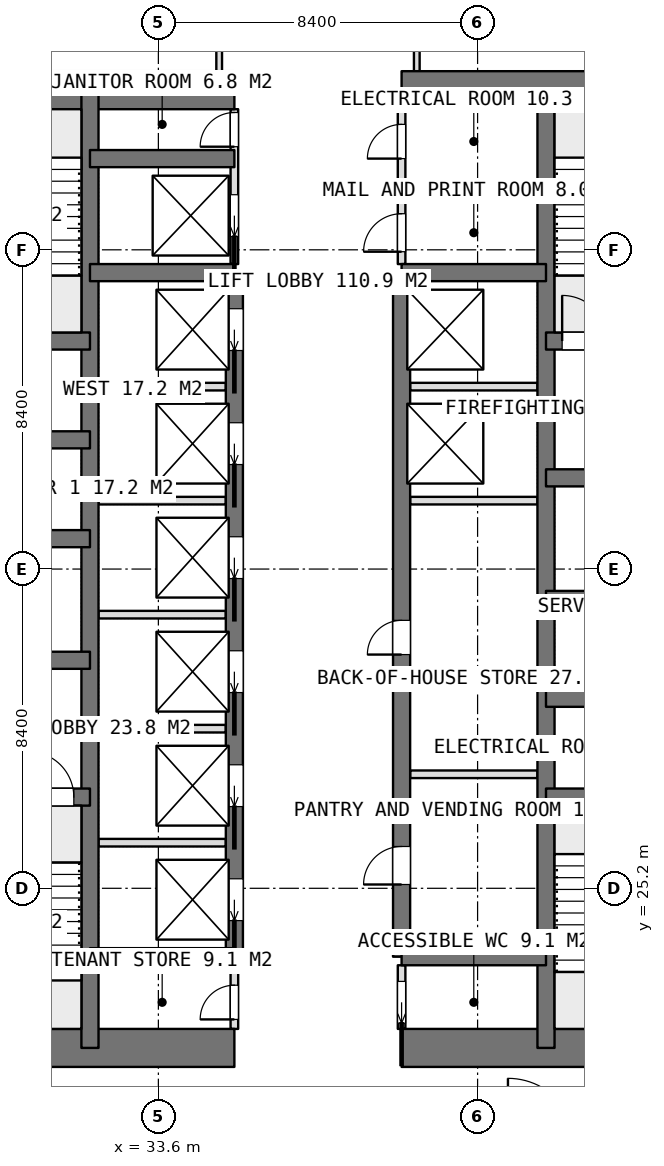
"""IFC4 building model, lengths in metres.
Left out: names, types, materials, properties, quantities, classifications, styles, units other than length and angle.
Written with IfcOpenShell. Run it as: python <this file> out.ifc"""

import sys

from ifc_helpers import new_model, si_unit, direction, frame, frame_2d, origin, place, context, subcontext, project, spatial, rectangle, extrude, element, fill, save


model = new_model("IFC4")
c1 = context("Model", 3, precision=1e-05, world=origin(), true_north=direction((0.0, 1.0)))
c2 = subcontext(c1, "Body", "Model", "MODEL_VIEW")
j1 = project(units=[si_unit("LENGTHUNIT", "METRE"), si_unit("PLANEANGLEUNIT", "RADIAN")], contexts=[c1])
p1 = place(None, origin())
s1 = spatial("IfcSite", under=j1, at=p1, CompositionType="ELEMENT")
p2 = place(p1, origin())
s2 = spatial("IfcBuilding", under=s1, at=p2, CompositionType="ELEMENT")
p3 = place(p2, frame((0.0, 0.0, 202.7)))
s3 = spatial("IfcBuildingStorey", under=s2, at=p3, CompositionType="ELEMENT", Elevation=202.7)
p4 = place(p3, frame((25.2, 21.0, 0.0), z_axis=(0.0, 0.0, 1.0), x_axis=(1.0, 0.0, 0.0)))
e1 = element("IfcWall", 1, at=p4, inside=s3, PredefinedType="SHEAR", context=c2, shape_type="SweptSolid", body=[
    extrude(rectangle(XDim=10.4, YDim=1.0, at=frame_2d((5.2, 0.0))), origin(), (0.0, 0.0, 1.0), 3.75),
])
p5 = place(p3, frame((40.0, 21.0, 0.0), z_axis=(0.0, 0.0, 1.0), x_axis=(1.0, 0.0, 0.0)))
e2 = element("IfcWall", 2, at=p5, inside=s3, PredefinedType="SHEAR", context=c2, shape_type="SweptSolid", body=[
    extrude(rectangle(XDim=10.4, YDim=1.0, at=frame_2d((5.2, 0.0))), origin(), (0.0, 0.0, 1.0), 3.75),
])
p6 = place(p3, frame((25.2, 46.2, 0.0), z_axis=(0.0, 0.0, 1.0), x_axis=(1.0, 0.0, 0.0)))
e3 = element("IfcWall", 3, at=p6, inside=s3, PredefinedType="SHEAR", context=c2, shape_type="SweptSolid", body=[
    extrude(rectangle(XDim=10.4, YDim=1.0, at=frame_2d((5.2, 0.0))), origin(), (0.0, 0.0, 1.0), 3.75),
])
p7 = place(p3, frame((40.0, 46.2, 0.0), z_axis=(0.0, 0.0, 1.0), x_axis=(1.0, 0.0, 0.0)))
e4 = element("IfcWall", 4, at=p7, inside=s3, PredefinedType="SHEAR", context=c2, shape_type="SweptSolid", body=[
    extrude(rectangle(XDim=10.4, YDim=1.0, at=frame_2d((5.2, 0.0))), origin(), (0.0, 0.0, 1.0), 3.75),
])
for number, where, z_axis, x_axis in (
    (5, (31.8, 21.0, 0.0), (0.0, 0.0, 1.0), (0.0, 1.0, 0.0)),
    (6, (43.8, 21.0, 0.0), (0.0, 0.0, 1.0), (0.0, 1.0, 0.0)),
):
    element("IfcWall", number, at=place(p3, frame(where, z_axis=z_axis, x_axis=x_axis)), inside=s3, PredefinedType="SHEAR", context=c2, shape_type="SweptSolid", body=[
        extrude(rectangle(XDim=25.2, YDim=0.45, at=frame_2d((12.6, 0.0))), origin(), (0.0, 0.0, 1.0), 3.75),
    ])
p8 = place(p3, frame((35.6, 23.4, 0.0), z_axis=(0.0, 0.0, 1.0), x_axis=(0.0, 1.0, 0.0)))
e7 = element("IfcWall", 7, at=p8, inside=s3, PredefinedType="SHEAR", context=c2, shape_type="SweptSolid", body=[
    extrude(rectangle(XDim=18.0, YDim=0.45, at=frame_2d((9.0, 0.0))), origin(), (0.0, 0.0, 1.0), 3.75),
])
p9 = place(p8, frame((0.95, 0.0, 0.0)))
e8 = element("IfcOpeningElement", 8, at=p9, cuts=e7, PredefinedType="OPENING", context=c2, shape_type="SweptSolid", body=[
    extrude(rectangle(XDim=1.1, YDim=2.1, at=frame_2d((0.55, 1.05))), frame((0.0, 0.235, 0.0), z_axis=(0.0, -1.0, 0.0), x_axis=(1.0, 0.0, 0.0)), (0.0, 0.0, 1.0), 0.47),
])
p10 = place(p8, frame((3.95, 0.0, 0.0)))
e9 = element("IfcOpeningElement", 9, at=p10, cuts=e7, PredefinedType="OPENING", context=c2, shape_type="SweptSolid", body=[
    extrude(rectangle(XDim=1.1, YDim=2.1, at=frame_2d((0.55, 1.05))), frame((0.0, 0.235, 0.0), z_axis=(0.0, -1.0, 0.0), x_axis=(1.0, 0.0, 0.0)), (0.0, 0.0, 1.0), 0.47),
])
p11 = place(p8, frame((6.95, 0.0, 0.0)))
e10 = element("IfcOpeningElement", 10, at=p11, cuts=e7, PredefinedType="OPENING", context=c2, shape_type="SweptSolid", body=[
    extrude(rectangle(XDim=1.1, YDim=2.1, at=frame_2d((0.55, 1.05))), frame((0.0, 0.235, 0.0), z_axis=(0.0, -1.0, 0.0), x_axis=(1.0, 0.0, 0.0)), (0.0, 0.0, 1.0), 0.47),
])
p12 = place(p8, frame((9.95, 0.0, 0.0)))
e11 = element("IfcOpeningElement", 11, at=p12, cuts=e7, PredefinedType="OPENING", context=c2, shape_type="SweptSolid", body=[
    extrude(rectangle(XDim=1.1, YDim=2.1, at=frame_2d((0.55, 1.05))), frame((0.0, 0.235, 0.0), z_axis=(0.0, -1.0, 0.0), x_axis=(1.0, 0.0, 0.0)), (0.0, 0.0, 1.0), 0.47),
])
p13 = place(p8, frame((12.95, 0.0, 0.0)))
e12 = element("IfcOpeningElement", 12, at=p13, cuts=e7, PredefinedType="OPENING", context=c2, shape_type="SweptSolid", body=[
    extrude(rectangle(XDim=1.1, YDim=2.1, at=frame_2d((0.55, 1.05))), frame((0.0, 0.235, 0.0), z_axis=(0.0, -1.0, 0.0), x_axis=(1.0, 0.0, 0.0)), (0.0, 0.0, 1.0), 0.47),
])
p14 = place(p8, frame((15.95, 0.0, 0.0)))
e13 = element("IfcOpeningElement", 13, at=p14, cuts=e7, PredefinedType="OPENING", context=c2, shape_type="SweptSolid", body=[
    extrude(rectangle(XDim=1.1, YDim=2.1, at=frame_2d((0.55, 1.05))), frame((0.0, 0.235, 0.0), z_axis=(0.0, -1.0, 0.0), x_axis=(1.0, 0.0, 0.0)), (0.0, 0.0, 1.0), 0.47),
])
p15 = place(p3, frame((40.0, 23.4, 0.0), z_axis=(0.0, 0.0, 1.0), x_axis=(0.0, 1.0, 0.0)))
e14 = element("IfcWall", 14, at=p15, inside=s3, PredefinedType="SHEAR", context=c2, shape_type="SweptSolid", body=[
    extrude(rectangle(XDim=18.0, YDim=0.45, at=frame_2d((9.0, 0.0))), origin(), (0.0, 0.0, 1.0), 3.75),
])
p16 = place(p15, frame((1.9, 0.0, 0.0)))
e15 = element("IfcOpeningElement", 15, at=p16, cuts=e14, PredefinedType="OPENING", context=c2, shape_type="SweptSolid", body=[
    extrude(rectangle(XDim=1.0, YDim=2.1, at=frame_2d((0.5, 1.05))), frame((0.0, 0.235, 0.0), z_axis=(0.0, -1.0, 0.0), x_axis=(1.0, 0.0, 0.0)), (0.0, 0.0, 1.0), 0.47),
])
p17 = place(p15, frame((7.95, 0.0, 0.0)))
e16 = element("IfcOpeningElement", 16, at=p17, cuts=e14, PredefinedType="OPENING", context=c2, shape_type="SweptSolid", body=[
    extrude(rectangle(XDim=0.9, YDim=2.1, at=frame_2d((0.45, 1.05))), frame((0.0, 0.235, 0.0), z_axis=(0.0, -1.0, 0.0), x_axis=(1.0, 0.0, 0.0)), (0.0, 0.0, 1.0), 0.47),
])
for number, where, z_axis, x_axis in (
    (17, (31.8, 23.4, 0.0), (0.0, 0.0, 1.0), (1.0, 0.0, 0.0)),
    (18, (31.8, 41.4, 0.0), (0.0, 0.0, 1.0), (1.0, 0.0, 0.0)),
    (19, (31.8, 44.4, 0.0), (0.0, 0.0, 1.0), (1.0, 0.0, 0.0)),
    (20, (40.0, 23.4, 0.0), (0.0, 0.0, 1.0), (1.0, 0.0, 0.0)),
    (21, (40.0, 41.4, 0.0), (0.0, 0.0, 1.0), (1.0, 0.0, 0.0)),
):
    element("IfcWall", number, at=place(p3, frame(where, z_axis=z_axis, x_axis=x_axis)), inside=s3, PredefinedType="SHEAR", context=c2, shape_type="SweptSolid", body=[
        extrude(rectangle(XDim=3.8, YDim=0.45, at=frame_2d((1.9, 0.0))), origin(), (0.0, 0.0, 1.0), 3.75),
    ])
p18 = place(p3, frame((25.2, 27.6, 0.0), z_axis=(0.0, 0.0, 1.0), x_axis=(1.0, 0.0, 0.0)))
e22 = element("IfcWall", 22, at=p18, inside=s3, PredefinedType="SHEAR", context=c2, shape_type="SweptSolid", body=[
    extrude(rectangle(XDim=6.6, YDim=0.45, at=frame_2d((3.3, 0.0))), origin(), (0.0, 0.0, 1.0), 3.75),
])
p19 = place(p18, frame((4.975, 0.0, 0.0)))
e23 = element("IfcOpeningElement", 23, at=p19, cuts=e22, PredefinedType="OPENING", context=c2, shape_type="SweptSolid", body=[
    extrude(rectangle(XDim=1.2, YDim=2.1, at=frame_2d((0.6, 1.05))), frame((0.0, 0.235, 0.0), z_axis=(0.0, -1.0, 0.0), x_axis=(1.0, 0.0, 0.0)), (0.0, 0.0, 1.0), 0.47),
])
p20 = place(p3, frame((25.2, 31.2, 0.0), z_axis=(0.0, 0.0, 1.0), x_axis=(1.0, 0.0, 0.0)))
e24 = element("IfcWall", 24, at=p20, inside=s3, PredefinedType="SHEAR", context=c2, shape_type="SweptSolid", body=[
    extrude(rectangle(XDim=6.6, YDim=0.45, at=frame_2d((3.3, 0.0))), origin(), (0.0, 0.0, 1.0), 3.75),
])
p21 = place(p20, frame((2.65, 0.0, 0.0)))
e25 = element("IfcOpeningElement", 25, at=p21, cuts=e24, PredefinedType="OPENING", context=c2, shape_type="SweptSolid", body=[
    extrude(rectangle(XDim=1.3, YDim=2.1, at=frame_2d((0.65, 1.05))), frame((0.0, 0.235, 0.0), z_axis=(0.0, -1.0, 0.0), x_axis=(1.0, 0.0, 0.0)), (0.0, 0.0, 1.0), 0.47),
])
for number, where, z_axis, x_axis in (
    (26, (25.2, 34.4, 0.0), (0.0, 0.0, 1.0), (1.0, 0.0, 0.0)),
    (27, (25.2, 37.0, 0.0), (0.0, 0.0, 1.0), (1.0, 0.0, 0.0)),
    (28, (25.2, 39.6, 0.0), (0.0, 0.0, 1.0), (1.0, 0.0, 0.0)),
):
    element("IfcWall", number, at=place(p3, frame(where, z_axis=z_axis, x_axis=x_axis)), inside=s3, PredefinedType="SHEAR", context=c2, shape_type="SweptSolid", body=[
        extrude(rectangle(XDim=6.6, YDim=0.45, at=frame_2d((3.3, 0.0))), origin(), (0.0, 0.0, 1.0), 3.75),
    ])
for number, where, z_axis, x_axis in (
    (29, (43.8, 27.6, 0.0), (0.0, 0.0, 1.0), (1.0, 0.0, 0.0)),
    (30, (43.8, 30.2, 0.0), (0.0, 0.0, 1.0), (1.0, 0.0, 0.0)),
    (31, (43.8, 32.8, 0.0), (0.0, 0.0, 1.0), (1.0, 0.0, 0.0)),
):
    element("IfcWall", number, at=place(p3, frame(where, z_axis=z_axis, x_axis=x_axis)), inside=s3, PredefinedType="SHEAR", context=c2, shape_type="SweptSolid", body=[
        extrude(rectangle(XDim=6.6, YDim=0.45, at=frame_2d((3.3, 0.0))), origin(), (0.0, 0.0, 1.0), 3.75),
    ])
p22 = place(p3, frame((43.8, 36.0, 0.0), z_axis=(0.0, 0.0, 1.0), x_axis=(1.0, 0.0, 0.0)))
e32 = element("IfcWall", 32, at=p22, inside=s3, PredefinedType="SHEAR", context=c2, shape_type="SweptSolid", body=[
    extrude(rectangle(XDim=6.6, YDim=0.45, at=frame_2d((3.3, 0.0))), origin(), (0.0, 0.0, 1.0), 3.75),
])
p23 = place(p22, frame((2.65, 0.0, 0.0)))
e33 = element("IfcOpeningElement", 33, at=p23, cuts=e32, PredefinedType="OPENING", context=c2, shape_type="SweptSolid", body=[
    extrude(rectangle(XDim=1.3, YDim=2.1, at=frame_2d((0.65, 1.05))), frame((0.0, 0.235, 0.0), z_axis=(0.0, -1.0, 0.0), x_axis=(1.0, 0.0, 0.0)), (0.0, 0.0, 1.0), 0.47),
])
p24 = place(p3, frame((43.8, 39.6, 0.0), z_axis=(0.0, 0.0, 1.0), x_axis=(1.0, 0.0, 0.0)))
e34 = element("IfcWall", 34, at=p24, inside=s3, PredefinedType="SHEAR", context=c2, shape_type="SweptSolid", body=[
    extrude(rectangle(XDim=6.6, YDim=0.45, at=frame_2d((3.3, 0.0))), origin(), (0.0, 0.0, 1.0), 3.75),
])
p25 = place(p24, frame((0.425, 0.0, 0.0)))
e35 = element("IfcOpeningElement", 35, at=p25, cuts=e34, PredefinedType="OPENING", context=c2, shape_type="SweptSolid", body=[
    extrude(rectangle(XDim=1.2, YDim=2.1, at=frame_2d((0.6, 1.05))), frame((0.0, 0.235, 0.0), z_axis=(0.0, -1.0, 0.0), x_axis=(1.0, 0.0, 0.0)), (0.0, 0.0, 1.0), 0.47),
])
for number, where, z_axis, x_axis in (
    (36, (32.025, 26.4, 0.0), (0.0, 0.0, 1.0), (1.0, 0.0, 0.0)),
    (37, (32.025, 29.4, 0.0), (0.0, 0.0, 1.0), (1.0, 0.0, 0.0)),
    (38, (32.025, 32.4, 0.0), (0.0, 0.0, 1.0), (1.0, 0.0, 0.0)),
    (39, (32.025, 35.4, 0.0), (0.0, 0.0, 1.0), (1.0, 0.0, 0.0)),
    (40, (32.025, 38.4, 0.0), (0.0, 0.0, 1.0), (1.0, 0.0, 0.0)),
):
    element("IfcWall", number, at=place(p3, frame(where, z_axis=z_axis, x_axis=x_axis)), inside=s3, PredefinedType="PARTITIONING", context=c2, shape_type="SweptSolid", body=[
        extrude(rectangle(XDim=3.35, YDim=0.2, at=frame_2d((1.675, 0.0))), origin(), (0.0, 0.0, 1.0), 3.5),
    ])
for number, where, z_axis, x_axis in (
    (41, (40.225, 35.4, 0.0), (0.0, 0.0, 1.0), (1.0, 0.0, 0.0)),
    (42, (40.225, 38.4, 0.0), (0.0, 0.0, 1.0), (1.0, 0.0, 0.0)),
):
    element("IfcWall", number, at=place(p3, frame(where, z_axis=z_axis, x_axis=x_axis)), inside=s3, PredefinedType="PARTITIONING", context=c2, shape_type="SweptSolid", body=[
        extrude(rectangle(XDim=3.35, YDim=0.2, at=frame_2d((1.675, 0.0))), origin(), (0.0, 0.0, 1.0), 3.5),
    ])
p26 = place(p3, frame((40.0, 21.5, 0.0), z_axis=(0.0, 0.0, 1.0), x_axis=(0.0, 1.0, 0.0)))
e43 = element("IfcWall", 43, at=p26, inside=s3, PredefinedType="PARTITIONING", context=c2, shape_type="SweptSolid", body=[
    extrude(rectangle(XDim=1.675, YDim=0.2, at=frame_2d((0.837, 0.0))), origin(), (0.0, 0.0, 1.0), 3.5),
])
p27 = place(p26, frame((0.15, 0.0, 0.0)))
e44 = element("IfcOpeningElement", 44, at=p27, cuts=e43, PredefinedType="OPENING", context=c2, shape_type="SweptSolid", body=[
    extrude(rectangle(XDim=1.1, YDim=2.1, at=frame_2d((0.55, 1.05))), frame((0.0, 0.11, 0.0), z_axis=(0.0, -1.0, 0.0), x_axis=(1.0, 0.0, 0.0)), (0.0, 0.0, 1.0), 0.22),
])
p28 = place(p3, frame((40.0, 41.625, 0.0), z_axis=(0.0, 0.0, 1.0), x_axis=(0.0, 1.0, 0.0)))
e45 = element("IfcWall", 45, at=p28, inside=s3, PredefinedType="PARTITIONING", context=c2, shape_type="SweptSolid", body=[
    extrude(rectangle(XDim=4.075, YDim=0.2, at=frame_2d((2.038, 0.0))), origin(), (0.0, 0.0, 1.0), 3.5),
])
p29 = place(p28, frame((2.775, 0.0, 0.0)))
e46 = element("IfcOpeningElement", 46, at=p29, cuts=e45, PredefinedType="OPENING", context=c2, shape_type="SweptSolid", body=[
    extrude(rectangle(XDim=0.9, YDim=2.1, at=frame_2d((0.45, 1.05))), frame((0.0, 0.11, 0.0), z_axis=(0.0, -1.0, 0.0), x_axis=(1.0, 0.0, 0.0)), (0.0, 0.0, 1.0), 0.22),
])
p30 = place(p28, frame((0.325, 0.0, 0.0)))
e47 = element("IfcOpeningElement", 47, at=p30, cuts=e45, PredefinedType="OPENING", context=c2, shape_type="SweptSolid", body=[
    extrude(rectangle(XDim=1.0, YDim=2.1, at=frame_2d((0.5, 1.05))), frame((0.0, 0.11, 0.0), z_axis=(0.0, -1.0, 0.0), x_axis=(1.0, 0.0, 0.0)), (0.0, 0.0, 1.0), 0.22),
])
p31 = place(p3, frame((35.6, 41.625, 0.0), z_axis=(0.0, 0.0, 1.0), x_axis=(0.0, 1.0, 0.0)))
e48 = element("IfcWall", 48, at=p31, inside=s3, PredefinedType="PARTITIONING", context=c2, shape_type="SweptSolid", body=[
    extrude(rectangle(XDim=4.075, YDim=0.2, at=frame_2d((2.038, 0.0))), origin(), (0.0, 0.0, 1.0), 3.5),
])
p32 = place(p31, frame((3.088, 0.0, 0.0)))
e49 = element("IfcOpeningElement", 49, at=p32, cuts=e48, PredefinedType="OPENING", context=c2, shape_type="SweptSolid", body=[
    extrude(rectangle(XDim=0.9, YDim=2.1, at=frame_2d((0.45, 1.05))), frame((0.0, 0.11, 0.0), z_axis=(0.0, -1.0, 0.0), x_axis=(1.0, 0.0, 0.0)), (0.0, 0.0, 1.0), 0.22),
])
p33 = place(p31, frame((0.725, 0.0, 0.0)))
e50 = element("IfcOpeningElement", 50, at=p33, cuts=e48, PredefinedType="OPENING", context=c2, shape_type="SweptSolid", body=[
    extrude(rectangle(XDim=1.1, YDim=2.1, at=frame_2d((0.55, 1.05))), frame((0.0, 0.11, 0.0), z_axis=(0.0, -1.0, 0.0), x_axis=(1.0, 0.0, 0.0)), (0.0, 0.0, 1.0), 0.22),
])
p34 = place(p3, frame((35.6, 21.5, 0.0), z_axis=(0.0, 0.0, 1.0), x_axis=(0.0, 1.0, 0.0)))
e51 = element("IfcWall", 51, at=p34, inside=s3, PredefinedType="PARTITIONING", context=c2, shape_type="SweptSolid", body=[
    extrude(rectangle(XDim=1.675, YDim=0.2, at=frame_2d((0.837, 0.0))), origin(), (0.0, 0.0, 1.0), 3.5),
])
p35 = place(p34, frame((0.25, 0.0, 0.0)))
e52 = element("IfcOpeningElement", 52, at=p35, cuts=e51, PredefinedType="OPENING", context=c2, shape_type="SweptSolid", body=[
    extrude(rectangle(XDim=0.9, YDim=2.1, at=frame_2d((0.45, 1.05))), frame((0.0, 0.11, 0.0), z_axis=(0.0, -1.0, 0.0), x_axis=(1.0, 0.0, 0.0)), (0.0, 0.0, 1.0), 0.22),
])
p36 = place(p3, frame((40.225, 28.2, 0.0), z_axis=(0.0, 0.0, 1.0), x_axis=(1.0, 0.0, 0.0)))
e53 = element("IfcWall", 53, at=p36, inside=s3, PredefinedType="PARTITIONING", context=c2, shape_type="SweptSolid", body=[
    extrude(rectangle(XDim=3.35, YDim=0.2, at=frame_2d((1.675, 0.0))), origin(), (0.0, 0.0, 1.0), 3.5),
])
p37 = place(p3, frame((40.0, 43.5, 0.0), z_axis=(0.0, 0.0, 1.0), x_axis=(1.0, 0.0, 0.0)))
e54 = element("IfcWall", 54, at=p37, inside=s3, PredefinedType="PARTITIONING", context=c2, shape_type="SweptSolid", body=[
    extrude(rectangle(XDim=3.575, YDim=0.2, at=frame_2d((1.788, 0.0))), origin(), (0.0, 0.0, 1.0), 3.5),
])
for number, where, z_axis, x_axis in (
    (55, (40.4, 46.7, 0.0), (0.0, 0.0, 1.0), (0.0, 1.0, 0.0)),
    (56, (35.2, 46.7, 0.0), (0.0, 0.0, 1.0), (0.0, 1.0, 0.0)),
):
    element("IfcWall", number, at=place(p3, frame(where, z_axis=z_axis, x_axis=x_axis)), inside=s3, PredefinedType="PARTITIONING", context=c2, shape_type="SweptSolid", body=[
        extrude(rectangle(XDim=2.625, YDim=0.15, at=frame_2d((1.312, 0.0))), origin(), (0.0, 0.0, 1.0), 3.5),
    ])
p38 = place(p27, origin())
e57 = element("IfcDoor", 57, at=p38, inside=s3, OperationType="SLIDING_TO_LEFT", PredefinedType="DOOR", context=c2, shape_type="SweptSolid", body=[
    extrude(rectangle(XDim=1.1, YDim=2.1, at=frame_2d((0.55, 1.05))), frame((0.0, 0.025, 0.0), z_axis=(0.0, -1.0, 0.0), x_axis=(1.0, 0.0, 0.0)), (0.0, 0.0, 1.0), 0.05),
])
fill(e44, e57)
p39 = place(p35, origin())
e58 = element("IfcDoor", 58, at=p39, inside=s3, OperationType="SINGLE_SWING_LEFT", PredefinedType="DOOR", context=c2, shape_type="SweptSolid", body=[
    extrude(rectangle(XDim=0.9, YDim=2.1, at=frame_2d((0.45, 1.05))), frame((0.0, 0.025, 0.0), z_axis=(0.0, -1.0, 0.0), x_axis=(1.0, 0.0, 0.0)), (0.0, 0.0, 1.0), 0.05),
])
fill(e52, e58)
p40 = place(p29, origin())
e59 = element("IfcDoor", 59, at=p40, inside=s3, OperationType="SINGLE_SWING_LEFT", PredefinedType="DOOR", context=c2, shape_type="SweptSolid", body=[
    extrude(rectangle(XDim=0.9, YDim=2.1, at=frame_2d((0.45, 1.05))), frame((0.0, 0.025, 0.0), z_axis=(0.0, -1.0, 0.0), x_axis=(1.0, 0.0, 0.0)), (0.0, 0.0, 1.0), 0.05),
])
fill(e46, e59)
p41 = place(p30, origin())
e60 = element("IfcDoor", 60, at=p41, inside=s3, OperationType="SINGLE_SWING_LEFT", PredefinedType="DOOR", context=c2, shape_type="SweptSolid", body=[
    extrude(rectangle(XDim=1.0, YDim=2.1, at=frame_2d((0.5, 1.05))), frame((0.0, 0.025, 0.0), z_axis=(0.0, -1.0, 0.0), x_axis=(1.0, 0.0, 0.0)), (0.0, 0.0, 1.0), 0.05),
])
fill(e47, e60)
p42 = place(p16, origin())
e61 = element("IfcDoor", 61, at=p42, inside=s3, OperationType="SINGLE_SWING_LEFT", PredefinedType="DOOR", context=c2, shape_type="SweptSolid", body=[
    extrude(rectangle(XDim=1.0, YDim=2.1, at=frame_2d((0.5, 1.05))), frame((0.0, 0.025, 0.0), z_axis=(0.0, -1.0, 0.0), x_axis=(1.0, 0.0, 0.0)), (0.0, 0.0, 1.0), 0.05),
])
fill(e15, e61)
p43 = place(p17, origin())
e62 = element("IfcDoor", 62, at=p43, inside=s3, OperationType="SINGLE_SWING_LEFT", PredefinedType="DOOR", context=c2, shape_type="SweptSolid", body=[
    extrude(rectangle(XDim=0.9, YDim=2.1, at=frame_2d((0.45, 1.05))), frame((0.0, 0.025, 0.0), z_axis=(0.0, -1.0, 0.0), x_axis=(1.0, 0.0, 0.0)), (0.0, 0.0, 1.0), 0.05),
])
fill(e16, e62)
p44 = place(p32, origin())
e63 = element("IfcDoor", 63, at=p44, inside=s3, OperationType="SINGLE_SWING_LEFT", PredefinedType="DOOR", context=c2, shape_type="SweptSolid", body=[
    extrude(rectangle(XDim=0.9, YDim=2.1, at=frame_2d((0.45, 1.05))), frame((0.0, 0.025, 0.0), z_axis=(0.0, -1.0, 0.0), x_axis=(1.0, 0.0, 0.0)), (0.0, 0.0, 1.0), 0.05),
])
fill(e49, e63)
p45 = place(p9, origin())
e64 = element("IfcDoor", 64, at=p45, inside=s3, OperationType="SLIDING_TO_LEFT", PredefinedType="USERDEFINED", context=c2, shape_type="SweptSolid", body=[
    extrude(rectangle(XDim=1.1, YDim=2.1, at=frame_2d((0.55, 1.05))), frame((0.0, 0.025, 0.0), z_axis=(0.0, -1.0, 0.0), x_axis=(1.0, 0.0, 0.0)), (0.0, 0.0, 1.0), 0.05),
])
fill(e8, e64)
p46 = place(p10, origin())
e65 = element("IfcDoor", 65, at=p46, inside=s3, OperationType="SLIDING_TO_LEFT", PredefinedType="USERDEFINED", context=c2, shape_type="SweptSolid", body=[
    extrude(rectangle(XDim=1.1, YDim=2.1, at=frame_2d((0.55, 1.05))), frame((0.0, 0.025, 0.0), z_axis=(0.0, -1.0, 0.0), x_axis=(1.0, 0.0, 0.0)), (0.0, 0.0, 1.0), 0.05),
])
fill(e9, e65)
p47 = place(p11, origin())
e66 = element("IfcDoor", 66, at=p47, inside=s3, OperationType="SLIDING_TO_LEFT", PredefinedType="USERDEFINED", context=c2, shape_type="SweptSolid", body=[
    extrude(rectangle(XDim=1.1, YDim=2.1, at=frame_2d((0.55, 1.05))), frame((0.0, 0.025, 0.0), z_axis=(0.0, -1.0, 0.0), x_axis=(1.0, 0.0, 0.0)), (0.0, 0.0, 1.0), 0.05),
])
fill(e10, e66)
p48 = place(p12, origin())
e67 = element("IfcDoor", 67, at=p48, inside=s3, OperationType="SLIDING_TO_LEFT", PredefinedType="USERDEFINED", context=c2, shape_type="SweptSolid", body=[
    extrude(rectangle(XDim=1.1, YDim=2.1, at=frame_2d((0.55, 1.05))), frame((0.0, 0.025, 0.0), z_axis=(0.0, -1.0, 0.0), x_axis=(1.0, 0.0, 0.0)), (0.0, 0.0, 1.0), 0.05),
])
fill(e11, e67)
p49 = place(p13, origin())
e68 = element("IfcDoor", 68, at=p49, inside=s3, OperationType="SLIDING_TO_LEFT", PredefinedType="USERDEFINED", context=c2, shape_type="SweptSolid", body=[
    extrude(rectangle(XDim=1.1, YDim=2.1, at=frame_2d((0.55, 1.05))), frame((0.0, 0.025, 0.0), z_axis=(0.0, -1.0, 0.0), x_axis=(1.0, 0.0, 0.0)), (0.0, 0.0, 1.0), 0.05),
])
fill(e12, e68)
p50 = place(p14, origin())
e69 = element("IfcDoor", 69, at=p50, inside=s3, OperationType="SLIDING_TO_LEFT", PredefinedType="USERDEFINED", context=c2, shape_type="SweptSolid", body=[
    extrude(rectangle(XDim=1.1, YDim=2.1, at=frame_2d((0.55, 1.05))), frame((0.0, 0.025, 0.0), z_axis=(0.0, -1.0, 0.0), x_axis=(1.0, 0.0, 0.0)), (0.0, 0.0, 1.0), 0.05),
])
fill(e13, e69)
p51 = place(p33, origin())
e70 = element("IfcDoor", 70, at=p51, inside=s3, OperationType="SLIDING_TO_LEFT", PredefinedType="USERDEFINED", context=c2, shape_type="SweptSolid", body=[
    extrude(rectangle(XDim=1.1, YDim=2.1, at=frame_2d((0.55, 1.05))), frame((0.0, 0.025, 0.0), z_axis=(0.0, -1.0, 0.0), x_axis=(1.0, 0.0, 0.0)), (0.0, 0.0, 1.0), 0.05),
])
fill(e50, e70)
p52 = place(p19, origin())
e71 = element("IfcDoor", 71, at=p52, inside=s3, OperationType="SINGLE_SWING_RIGHT", PredefinedType="DOOR", context=c2, shape_type="SweptSolid", body=[
    extrude(rectangle(XDim=1.2, YDim=2.1, at=frame_2d((0.6, 1.05))), frame((0.0, 0.025, 0.0), z_axis=(0.0, -1.0, 0.0), x_axis=(1.0, 0.0, 0.0)), (0.0, 0.0, 1.0), 0.05),
])
fill(e23, e71)
p53 = place(p25, origin())
e72 = element("IfcDoor", 72, at=p53, inside=s3, OperationType="SINGLE_SWING_RIGHT", PredefinedType="DOOR", context=c2, shape_type="SweptSolid", body=[
    extrude(rectangle(XDim=1.2, YDim=2.1, at=frame_2d((0.6, 1.05))), frame((0.0, 0.025, 0.0), z_axis=(0.0, -1.0, 0.0), x_axis=(1.0, 0.0, 0.0)), (0.0, 0.0, 1.0), 0.05),
])
fill(e35, e72)
save(model, sys.argv[1])
